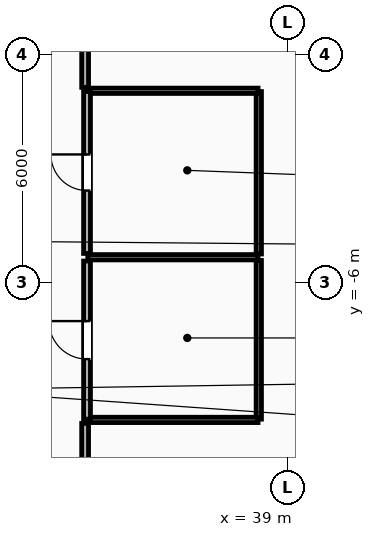
"""IFC4 building model, lengths in metres.
Left out: names, types, materials, properties, quantities, classifications, styles, units other than length and angle.
Written with IfcOpenShell. Run it as: python <this file> out.ifc"""

import sys

from ifc_helpers import new_model, si_unit, direction, frame, frame_2d, origin, place, context, subcontext, project, spatial, rectangle, extrude, element, fill, save


model = new_model("IFC4")
c1 = context("Model", 3, precision=1e-05, world=origin(), true_north=direction((0.0, 1.0)))
c2 = subcontext(c1, "Body", "Model", "MODEL_VIEW")
j1 = project(units=[si_unit("LENGTHUNIT", "METRE"), si_unit("PLANEANGLEUNIT", "RADIAN")], contexts=[c1])
p1 = place(None, origin())
s1 = spatial("IfcSite", under=j1, at=p1, CompositionType="ELEMENT")
p2 = place(p1, origin())
s2 = spatial("IfcBuilding", under=s1, at=p2, CompositionType="ELEMENT")
p3 = place(p2, frame((0.0, 0.0, 128.6)))
s3 = spatial("IfcBuildingStorey", under=s2, at=p3, CompositionType="ELEMENT", Elevation=128.6)
p4 = place(p3, frame((38.24, -9.59, 0.0), z_axis=(0.0, 0.0, 1.0), x_axis=(0.0, 1.0, 0.0)))
e1 = element("IfcWall", 1, at=p4, inside=s3, PredefinedType="PARTITIONING", context=c2, shape_type="SweptSolid", body=[
    extrude(rectangle(XDim=4.175, YDim=0.14, at=frame_2d((2.087, 0.0))), origin(), (0.0, 0.0, 1.0), 3.32),
])
p5 = place(p3, frame((38.24, -5.245, 0.0), z_axis=(0.0, 0.0, 1.0), x_axis=(0.0, 1.0, 0.0)))
e2 = element("IfcWall", 2, at=p5, inside=s3, PredefinedType="PARTITIONING", context=c2, shape_type="SweptSolid", body=[
    extrude(rectangle(XDim=4.275, YDim=0.14, at=frame_2d((2.138, 0.0))), origin(), (0.0, 0.0, 1.0), 3.32),
])
for number, where, z_axis, x_axis in (
    (3, (33.74, -0.95, 0.0), (0.0, 0.0, 1.0), (1.0, 0.0, 0.0)),
    (4, (33.74, -5.33, 0.0), (0.0, 0.0, 1.0), (1.0, 0.0, 0.0)),
    (5, (33.74, -9.61, 0.0), (0.0, 0.0, 1.0), (1.0, 0.0, 0.0)),
):
    element("IfcWall", number, at=place(p3, frame(where, z_axis=z_axis, x_axis=x_axis)), inside=s3, PredefinedType="PARTITIONING", context=c2, shape_type="SweptSolid", body=[
        extrude(rectangle(XDim=4.48, YDim=0.14, at=frame_2d((2.24, 0.0))), origin(), (0.0, 0.0, 1.0), 3.32),
    ])
p6 = place(p3, frame((33.72, -5.23, 0.0), z_axis=(0.0, 0.0, 1.0), x_axis=(0.0, 1.0, 0.0)))
e6 = element("IfcWall", 6, at=p6, inside=s3, PredefinedType="PARTITIONING", context=c2, shape_type="SweptSolid", body=[
    extrude(rectangle(XDim=4.26, YDim=0.18, at=frame_2d((2.13, 0.0))), origin(), (0.0, 0.0, 1.0), 3.32),
])
p7 = place(p6, frame((1.655, 0.0, 0.0)))
e7 = element("IfcOpeningElement", 7, at=p7, cuts=e6, PredefinedType="OPENING", context=c2, shape_type="SweptSolid", body=[
    extrude(rectangle(XDim=0.95, YDim=2.1, at=frame_2d((0.475, 1.05))), frame((0.0, 0.1, 0.0), z_axis=(0.0, -1.0, 0.0), x_axis=(1.0, 0.0, 0.0)), (0.0, 0.0, 1.0), 0.2),
])
p8 = place(p3, frame((33.72, -9.59, 0.0), z_axis=(0.0, 0.0, 1.0), x_axis=(0.0, 1.0, 0.0)))
e8 = element("IfcWall", 8, at=p8, inside=s3, PredefinedType="PARTITIONING", context=c2, shape_type="SweptSolid", body=[
    extrude(rectangle(XDim=4.16, YDim=0.18, at=frame_2d((2.08, 0.0))), origin(), (0.0, 0.0, 1.0), 3.32),
])
p9 = place(p8, frame((1.58, 0.0, 0.0)))
e9 = element("IfcOpeningElement", 9, at=p9, cuts=e8, PredefinedType="OPENING", context=c2, shape_type="SweptSolid", body=[
    extrude(rectangle(XDim=1.0, YDim=2.15, at=frame_2d((0.5, 1.075))), frame((0.0, 0.1, 0.0), z_axis=(0.0, -1.0, 0.0), x_axis=(1.0, 0.0, 0.0)), (0.0, 0.0, 1.0), 0.2),
])
p10 = place(p3, frame((33.67, -0.859, 0.0), z_axis=(0.0, 0.0, 1.0), x_axis=(0.0, 1.0, 0.0)))
e10 = element("IfcWall", 10, at=p10, inside=s3, PredefinedType="PARTITIONING", context=c2, shape_type="SweptSolid", body=[
    extrude(rectangle(XDim=12.259, YDim=0.18, at=frame_2d((6.129, 0.0))), origin(), (0.0, 0.0, 1.0), 3.32),
])
p11 = place(p3, frame((33.67, -17.428, 0.0), z_axis=(0.0, 0.0, 1.0), x_axis=(0.0, 1.0, 0.0)))
e11 = element("IfcWall", 11, at=p11, inside=s3, PredefinedType="PARTITIONING", context=c2, shape_type="SweptSolid", body=[
    extrude(rectangle(XDim=7.727, YDim=0.18, at=frame_2d((3.864, 0.0))), origin(), (0.0, 0.0, 1.0), 3.32),
])
p12 = place(p7, origin())
e12 = element("IfcDoor", 12, at=p12, inside=s3, OperationType="SINGLE_SWING_RIGHT", PredefinedType="DOOR", context=c2, shape_type="SweptSolid", body=[
    extrude(rectangle(XDim=0.95, YDim=2.1, at=frame_2d((0.475, 1.05))), frame((0.0, 0.025, 0.0), z_axis=(0.0, -1.0, 0.0), x_axis=(1.0, 0.0, 0.0)), (0.0, 0.0, 1.0), 0.05),
])
fill(e7, e12)
p13 = place(p9, origin())
e13 = element("IfcDoor", 13, at=p13, inside=s3, OperationType="SINGLE_SWING_RIGHT", PredefinedType="DOOR", context=c2, shape_type="SweptSolid", body=[
    extrude(rectangle(XDim=1.0, YDim=2.15, at=frame_2d((0.5, 1.075))), frame((0.0, 0.025, 0.0), z_axis=(0.0, -1.0, 0.0), x_axis=(1.0, 0.0, 0.0)), (0.0, 0.0, 1.0), 0.05),
])
fill(e9, e13)
save(model, sys.argv[1])
